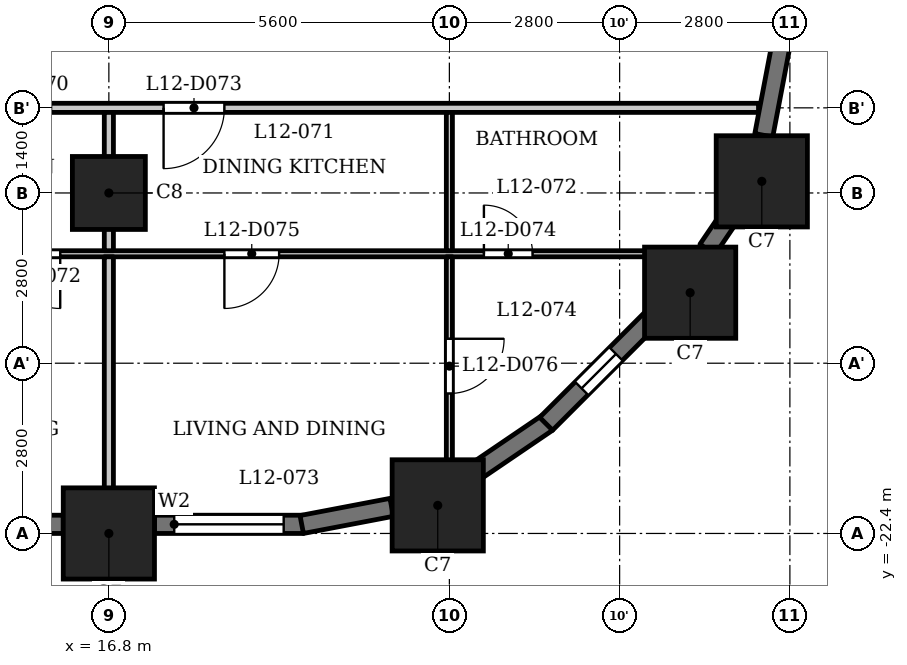
"""IFC4 building model, lengths in metres.
Left out: names, types, materials, properties, quantities, classifications, styles, units other than length and angle.
Written with IfcOpenShell. Run it as: python <this file> out.ifc"""

import sys

from ifc_helpers import new_model, si_unit, direction, frame, frame_2d, origin, origin_2d, place, context, subcontext, project, spatial, rectangle, extrude, element, fill, save


model = new_model("IFC4")
c1 = context("Model", 3, precision=1e-05, world=origin(), true_north=direction((0.0, 1.0)))
c2 = subcontext(c1, "Body", "Model", "MODEL_VIEW")
j1 = project(units=[si_unit("LENGTHUNIT", "METRE"), si_unit("PLANEANGLEUNIT", "RADIAN")], contexts=[c1])
p1 = place(None, origin())
s1 = spatial("IfcSite", under=j1, at=p1, CompositionType="ELEMENT")
p2 = place(p1, origin())
s2 = spatial("IfcBuilding", under=s1, at=p2, CompositionType="ELEMENT")
p3 = place(p2, frame((0.0, 0.0, 51.5)))
s3 = spatial("IfcBuildingStorey", under=s2, at=p3, CompositionType="ELEMENT", Elevation=51.5)
for number, where, z_axis, x_axis in (
    (1, (16.8, -22.4, 0.0), (0.0, 0.0, 1.0), (1.0, 0.0, 0.0)),
    (2, (22.209, -21.938, 0.0), (0.0, 0.0, 1.0), (1.0, 0.0, 0.0)),
    (3, (26.36, -18.44, 0.0), (0.0, 0.0, 1.0), (1.0, 0.0, 0.0)),
    (4, (27.538, -16.609, 0.0), (0.0, 0.0, 1.0), (1.0, 0.0, 0.0)),
):
    element("IfcColumn", number, at=place(p3, frame(where, z_axis=z_axis, x_axis=x_axis)), inside=s3, PredefinedType="COLUMN", context=c2, shape_type="SweptSolid", body=[
        extrude(rectangle(XDim=1.5, YDim=1.5, at=origin_2d()), origin(), (0.0, 0.0, 1.0), 3.5),
    ])
p4 = place(p3, frame((16.8, -16.8, 0.0), z_axis=(0.0, 0.0, 1.0), x_axis=(1.0, 0.0, 0.0)))
e5 = element("IfcColumn", 5, at=p4, inside=s3, PredefinedType="COLUMN", context=c2, shape_type="SweptSolid", body=[
    extrude(rectangle(XDim=1.2, YDim=1.2, at=origin_2d()), origin(), (0.0, 0.0, 1.0), 3.5),
])
p5 = place(p3, frame((11.95, -22.25, 0.0), z_axis=(0.0, 0.0, 1.0), x_axis=(1.0, 0.0, 0.0)))
e6 = element("IfcWall", 6, at=p5, inside=s3, PredefinedType="SOLIDWALL", context=c2, shape_type="SweptSolid", body=[
    extrude(rectangle(XDim=4.1, YDim=0.3, at=frame_2d((2.05, 0.0))), origin(), (0.0, 0.0, 1.0), 2.35),
])
p6 = place(p5, frame((0.75, 0.0, 0.9)))
e7 = element("IfcOpeningElement", 7, at=p6, cuts=e6, PredefinedType="OPENING", context=c2, shape_type="SweptSolid", body=[
    extrude(rectangle(XDim=2.6, YDim=1.25, at=frame_2d((1.3, 0.625))), frame((0.0, 0.16, 0.0), z_axis=(0.0, -1.0, 0.0), x_axis=(1.0, 0.0, 0.0)), (0.0, 0.0, 1.0), 0.32),
])
p7 = place(p3, frame((17.55, -22.25, 0.0), z_axis=(0.0, 0.0, 1.0), x_axis=(1.0, 0.0, 0.0)))
e8 = element("IfcWall", 8, at=p7, inside=s3, PredefinedType="SOLIDWALL", context=c2, shape_type="SweptSolid", body=[
    extrude(rectangle(XDim=2.45, YDim=0.3, at=frame_2d((1.225, 0.0))), origin(), (0.0, 0.0, 1.0), 2.35),
])
p8 = place(p7, frame((0.325, 0.0, 0.9)))
e9 = element("IfcOpeningElement", 9, at=p8, cuts=e8, PredefinedType="OPENING", context=c2, shape_type="SweptSolid", body=[
    extrude(rectangle(XDim=1.8, YDim=1.25, at=frame_2d((0.9, 0.625))), frame((0.0, 0.16, 0.0), z_axis=(0.0, -1.0, 0.0), x_axis=(1.0, 0.0, 0.0)), (0.0, 0.0, 1.0), 0.32),
])
for number, where, z_axis, x_axis in (
    (10, (19.972, -22.253, 0.0), (0.0, 0.0, 1.0), (0.982, 0.187, 0.0)),
    (11, (22.767, -21.426, 0.0), (0.0, 0.0, 1.0), (0.827, 0.562, 0.0)),
):
    element("IfcWall", number, at=place(p3, frame(where, z_axis=z_axis, x_axis=x_axis)), inside=s3, PredefinedType="SOLIDWALL", context=c2, shape_type="SweptSolid", body=[
        extrude(rectangle(XDim=1.506, YDim=0.3, at=frame_2d((0.753, 0.0))), origin(), (0.0, 0.0, 1.0), 2.35),
    ])
p9 = place(p3, frame((23.991, -20.597, 0.0), z_axis=(0.0, 0.0, 1.0), x_axis=(0.707106781187, 0.707106781187, 0.0)))
e12 = element("IfcWall", 12, at=p9, inside=s3, PredefinedType="SOLIDWALL", context=c2, shape_type="SweptSolid", body=[
    extrude(rectangle(XDim=2.45, YDim=0.3, at=frame_2d((1.225, 0.0))), origin(), (0.0, 0.0, 1.0), 2.35),
])
p10 = place(p9, frame((0.825, 0.0, 0.6)))
e13 = element("IfcOpeningElement", 13, at=p10, cuts=e12, PredefinedType="OPENING", context=c2, shape_type="SweptSolid", body=[
    extrude(rectangle(XDim=0.8, YDim=1.55, at=frame_2d((0.4, 0.775))), frame((0.0, 0.16, 0.0), z_axis=(0.0, -1.0, 0.0), x_axis=(1.0, 0.0, 0.0)), (0.0, 0.0, 1.0), 0.32),
])
p11 = place(p3, frame((26.645, -17.727, 0.0), z_axis=(0.0, 0.0, 1.0), x_axis=(0.562083182981, 0.827080706709, 0.0)))
e14 = element("IfcWall", 14, at=p11, inside=s3, PredefinedType="SOLIDWALL", context=c2, shape_type="SweptSolid", body=[
    extrude(rectangle(XDim=0.677, YDim=0.3, at=frame_2d((0.339, 0.0))), origin(), (0.0, 0.0, 1.0), 3.2),
])
p12 = place(p3, frame((27.571, -15.851, 0.0), z_axis=(0.0, 0.0, 1.0), x_axis=(0.187223837635, 0.982317277982, 0.0)))
e15 = element("IfcWall", 15, at=p12, inside=s3, PredefinedType="SOLIDWALL", context=c2, shape_type="SweptSolid", body=[
    extrude(rectangle(XDim=1.506, YDim=0.3, at=frame_2d((0.753, 0.0))), origin(), (0.0, 0.0, 1.0), 2.35),
])
p13 = place(p3, frame((-26.394, -17.8, 0.0), z_axis=(0.0, 0.0, 1.0), x_axis=(1.0, 0.0, 0.0)))
e16 = element("IfcWall", 16, at=p13, inside=s3, PredefinedType="PARTITIONING", context=c2, shape_type="SweptSolid", body=[
    extrude(rectangle(XDim=53.126, YDim=0.1, at=frame_2d((26.563, 0.0))), origin(), (0.0, 0.0, 1.0), 3.2),
])
p14 = place(p13, frame((0.794, 0.0, 0.0)))
e17 = element("IfcOpeningElement", 17, at=p14, cuts=e16, PredefinedType="OPENING", context=c2, shape_type="SweptSolid", body=[
    extrude(rectangle(XDim=0.8, YDim=2.1, at=frame_2d((0.4, 1.05))), frame((0.0, 0.06, 0.0), z_axis=(0.0, -1.0, 0.0), x_axis=(1.0, 0.0, 0.0)), (0.0, 0.0, 1.0), 0.12),
])
p15 = place(p13, frame((5.644, 0.0, 0.0)))
e18 = element("IfcOpeningElement", 18, at=p15, cuts=e16, PredefinedType="OPENING", context=c2, shape_type="SweptSolid", body=[
    extrude(rectangle(XDim=0.9, YDim=2.1, at=frame_2d((0.45, 1.05))), frame((0.0, 0.06, 0.0), z_axis=(0.0, -1.0, 0.0), x_axis=(1.0, 0.0, 0.0)), (0.0, 0.0, 1.0), 0.12),
])
p16 = place(p13, frame((19.344, 0.0, 0.0)))
e19 = element("IfcOpeningElement", 19, at=p16, cuts=e16, PredefinedType="OPENING", context=c2, shape_type="SweptSolid", body=[
    extrude(rectangle(XDim=0.8, YDim=2.1, at=frame_2d((0.4, 1.05))), frame((0.0, 0.06, 0.0), z_axis=(0.0, -1.0, 0.0), x_axis=(1.0, 0.0, 0.0)), (0.0, 0.0, 1.0), 0.12),
])
p17 = place(p13, frame((17.094, 0.0, 0.0)))
e20 = element("IfcOpeningElement", 20, at=p17, cuts=e16, PredefinedType="OPENING", context=c2, shape_type="SweptSolid", body=[
    extrude(rectangle(XDim=0.9, YDim=2.1, at=frame_2d((0.45, 1.05))), frame((0.0, 0.06, 0.0), z_axis=(0.0, -1.0, 0.0), x_axis=(1.0, 0.0, 0.0)), (0.0, 0.0, 1.0), 0.12),
])
p18 = place(p13, frame((10.494, 0.0, 0.0)))
e21 = element("IfcOpeningElement", 21, at=p18, cuts=e16, PredefinedType="OPENING", context=c2, shape_type="SweptSolid", body=[
    extrude(rectangle(XDim=0.9, YDim=2.1, at=frame_2d((0.45, 1.05))), frame((0.0, 0.06, 0.0), z_axis=(0.0, -1.0, 0.0), x_axis=(1.0, 0.0, 0.0)), (0.0, 0.0, 1.0), 0.12),
])
p19 = place(p13, frame((13.294, 0.0, 0.0)))
e22 = element("IfcOpeningElement", 22, at=p19, cuts=e16, PredefinedType="OPENING", context=c2, shape_type="SweptSolid", body=[
    extrude(rectangle(XDim=0.9, YDim=2.1, at=frame_2d((0.45, 1.05))), frame((0.0, 0.06, 0.0), z_axis=(0.0, -1.0, 0.0), x_axis=(1.0, 0.0, 0.0)), (0.0, 0.0, 1.0), 0.12),
])
p20 = place(p13, frame((27.044, 0.0, 0.0)))
e23 = element("IfcOpeningElement", 23, at=p20, cuts=e16, PredefinedType="OPENING", context=c2, shape_type="SweptSolid", body=[
    extrude(rectangle(XDim=0.8, YDim=2.1, at=frame_2d((0.4, 1.05))), frame((0.0, 0.06, 0.0), z_axis=(0.0, -1.0, 0.0), x_axis=(1.0, 0.0, 0.0)), (0.0, 0.0, 1.0), 0.12),
])
p21 = place(p13, frame((22.444, 0.0, 0.0)))
e24 = element("IfcOpeningElement", 24, at=p21, cuts=e16, PredefinedType="OPENING", context=c2, shape_type="SweptSolid", body=[
    extrude(rectangle(XDim=0.9, YDim=2.1, at=frame_2d((0.45, 1.05))), frame((0.0, 0.06, 0.0), z_axis=(0.0, -1.0, 0.0), x_axis=(1.0, 0.0, 0.0)), (0.0, 0.0, 1.0), 0.12),
])
p22 = place(p13, frame((36.144, 0.0, 0.0)))
e25 = element("IfcOpeningElement", 25, at=p22, cuts=e16, PredefinedType="OPENING", context=c2, shape_type="SweptSolid", body=[
    extrude(rectangle(XDim=0.8, YDim=2.1, at=frame_2d((0.4, 1.05))), frame((0.0, 0.06, 0.0), z_axis=(0.0, -1.0, 0.0), x_axis=(1.0, 0.0, 0.0)), (0.0, 0.0, 1.0), 0.12),
])
p23 = place(p13, frame((33.644, 0.0, 0.0)))
e26 = element("IfcOpeningElement", 26, at=p23, cuts=e16, PredefinedType="OPENING", context=c2, shape_type="SweptSolid", body=[
    extrude(rectangle(XDim=0.9, YDim=2.1, at=frame_2d((0.45, 1.05))), frame((0.0, 0.06, 0.0), z_axis=(0.0, -1.0, 0.0), x_axis=(1.0, 0.0, 0.0)), (0.0, 0.0, 1.0), 0.12),
])
p24 = place(p13, frame((39.144, 0.0, 0.0)))
e27 = element("IfcOpeningElement", 27, at=p24, cuts=e16, PredefinedType="OPENING", context=c2, shape_type="SweptSolid", body=[
    extrude(rectangle(XDim=0.8, YDim=2.1, at=frame_2d((0.4, 1.05))), frame((0.0, 0.06, 0.0), z_axis=(0.0, -1.0, 0.0), x_axis=(1.0, 0.0, 0.0)), (0.0, 0.0, 1.0), 0.12),
])
p25 = place(p13, frame((41.494, 0.0, 0.0)))
e28 = element("IfcOpeningElement", 28, at=p25, cuts=e16, PredefinedType="OPENING", context=c2, shape_type="SweptSolid", body=[
    extrude(rectangle(XDim=0.9, YDim=2.1, at=frame_2d((0.45, 1.05))), frame((0.0, 0.06, 0.0), z_axis=(0.0, -1.0, 0.0), x_axis=(1.0, 0.0, 0.0)), (0.0, 0.0, 1.0), 0.12),
])
p26 = place(p13, frame((49.362, 0.0, 0.0)))
e29 = element("IfcOpeningElement", 29, at=p26, cuts=e16, PredefinedType="OPENING", context=c2, shape_type="SweptSolid", body=[
    extrude(rectangle(XDim=0.8, YDim=2.1, at=frame_2d((0.4, 1.05))), frame((0.0, 0.06, 0.0), z_axis=(0.0, -1.0, 0.0), x_axis=(1.0, 0.0, 0.0)), (0.0, 0.0, 1.0), 0.12),
])
p27 = place(p13, frame((45.094, 0.0, 0.0)))
e30 = element("IfcOpeningElement", 30, at=p27, cuts=e16, PredefinedType="OPENING", context=c2, shape_type="SweptSolid", body=[
    extrude(rectangle(XDim=0.9, YDim=2.1, at=frame_2d((0.45, 1.05))), frame((0.0, 0.06, 0.0), z_axis=(0.0, -1.0, 0.0), x_axis=(1.0, 0.0, 0.0)), (0.0, 0.0, 1.0), 0.12),
])
p28 = place(p3, frame((-27.484, -15.4, 0.0), z_axis=(0.0, 0.0, 1.0), x_axis=(1.0, 0.0, 0.0)))
e31 = element("IfcWall", 31, at=p28, inside=s3, PredefinedType="PARTITIONING", context=c2, shape_type="SweptSolid", body=[
    extrude(rectangle(XDim=54.968, YDim=0.15, at=frame_2d((27.484, 0.0))), origin(), (0.0, 0.0, 1.0), 3.2),
])
p29 = place(p28, frame((5.734, 0.0, 0.0)))
e32 = element("IfcOpeningElement", 32, at=p29, cuts=e31, PredefinedType="OPENING", context=c2, shape_type="SweptSolid", body=[
    extrude(rectangle(XDim=1.0, YDim=2.1, at=frame_2d((0.5, 1.05))), frame((0.0, 0.085, 0.0), z_axis=(0.0, -1.0, 0.0), x_axis=(1.0, 0.0, 0.0)), (0.0, 0.0, 1.0), 0.17),
])
p30 = place(p28, frame((11.584, 0.0, 0.0)))
e33 = element("IfcOpeningElement", 33, at=p30, cuts=e31, PredefinedType="OPENING", context=c2, shape_type="SweptSolid", body=[
    extrude(rectangle(XDim=1.0, YDim=2.1, at=frame_2d((0.5, 1.05))), frame((0.0, 0.085, 0.0), z_axis=(0.0, -1.0, 0.0), x_axis=(1.0, 0.0, 0.0)), (0.0, 0.0, 1.0), 0.17),
])
p31 = place(p28, frame((22.534, 0.0, 0.0)))
e34 = element("IfcOpeningElement", 34, at=p31, cuts=e31, PredefinedType="OPENING", context=c2, shape_type="SweptSolid", body=[
    extrude(rectangle(XDim=1.0, YDim=2.1, at=frame_2d((0.5, 1.05))), frame((0.0, 0.085, 0.0), z_axis=(0.0, -1.0, 0.0), x_axis=(1.0, 0.0, 0.0)), (0.0, 0.0, 1.0), 0.17),
])
p32 = place(p28, frame((33.734, 0.0, 0.0)))
e35 = element("IfcOpeningElement", 35, at=p32, cuts=e31, PredefinedType="OPENING", context=c2, shape_type="SweptSolid", body=[
    extrude(rectangle(XDim=1.0, YDim=2.1, at=frame_2d((0.5, 1.05))), frame((0.0, 0.085, 0.0), z_axis=(0.0, -1.0, 0.0), x_axis=(1.0, 0.0, 0.0)), (0.0, 0.0, 1.0), 0.17),
])
p33 = place(p28, frame((42.334, 0.0, 0.0)))
e36 = element("IfcOpeningElement", 36, at=p33, cuts=e31, PredefinedType="OPENING", context=c2, shape_type="SweptSolid", body=[
    extrude(rectangle(XDim=1.0, YDim=2.1, at=frame_2d((0.5, 1.05))), frame((0.0, 0.085, 0.0), z_axis=(0.0, -1.0, 0.0), x_axis=(1.0, 0.0, 0.0)), (0.0, 0.0, 1.0), 0.17),
])
p34 = place(p28, frame((45.184, 0.0, 0.0)))
e37 = element("IfcOpeningElement", 37, at=p34, cuts=e31, PredefinedType="OPENING", context=c2, shape_type="SweptSolid", body=[
    extrude(rectangle(XDim=1.0, YDim=2.1, at=frame_2d((0.5, 1.05))), frame((0.0, 0.085, 0.0), z_axis=(0.0, -1.0, 0.0), x_axis=(1.0, 0.0, 0.0)), (0.0, 0.0, 1.0), 0.17),
])
p35 = place(p3, frame((16.8, -23.13, 0.0), z_axis=(0.0, 0.0, 1.0), x_axis=(0.0, 1.0, 0.0)))
e38 = element("IfcWall", 38, at=p35, inside=s3, PredefinedType="PARTITIONING", context=c2, shape_type="SweptSolid", body=[
    extrude(rectangle(XDim=5.28, YDim=0.15, at=frame_2d((2.64, 0.0))), origin(), (0.0, 0.0, 1.0), 3.2),
])
p36 = place(p3, frame((16.8, -17.75, 0.0), z_axis=(0.0, 0.0, 1.0), x_axis=(0.0, 1.0, 0.0)))
e39 = element("IfcWall", 39, at=p36, inside=s3, PredefinedType="PARTITIONING", context=c2, shape_type="SweptSolid", body=[
    extrude(rectangle(XDim=2.275, YDim=0.15, at=frame_2d((1.137, 0.0))), origin(), (0.0, 0.0, 1.0), 3.2),
])
p37 = place(p3, frame((22.4, -21.72, 0.0), z_axis=(0.0, 0.0, 1.0), x_axis=(0.0, 1.0, 0.0)))
e40 = element("IfcWall", 40, at=p37, inside=s3, PredefinedType="PARTITIONING", context=c2, shape_type="SweptSolid", body=[
    extrude(rectangle(XDim=3.87, YDim=0.1, at=frame_2d((1.935, 0.0))), origin(), (0.0, 0.0, 1.0), 3.2),
])
p38 = place(p37, frame((1.622, 0.0, 0.0)))
e41 = element("IfcOpeningElement", 41, at=p38, cuts=e40, PredefinedType="OPENING", context=c2, shape_type="SweptSolid", body=[
    extrude(rectangle(XDim=0.9, YDim=2.1, at=frame_2d((0.45, 1.05))), frame((0.0, 0.06, 0.0), z_axis=(0.0, -1.0, 0.0), x_axis=(1.0, 0.0, 0.0)), (0.0, 0.0, 1.0), 0.12),
])
p39 = place(p3, frame((22.4, -17.75, 0.0), z_axis=(0.0, 0.0, 1.0), x_axis=(0.0, 1.0, 0.0)))
e42 = element("IfcWall", 42, at=p39, inside=s3, PredefinedType="PARTITIONING", context=c2, shape_type="SweptSolid", body=[
    extrude(rectangle(XDim=2.275, YDim=0.1, at=frame_2d((1.137, 0.0))), origin(), (0.0, 0.0, 1.0), 3.2),
])
p40 = place(p25, origin())
e43 = element("IfcDoor", 43, at=p40, inside=s3, OperationType="SINGLE_SWING_RIGHT", PredefinedType="DOOR", context=c2, shape_type="SweptSolid", body=[
    extrude(rectangle(XDim=0.9, YDim=2.1, at=frame_2d((0.45, 1.05))), frame((0.0, 0.025, 0.0), z_axis=(0.0, -1.0, 0.0), x_axis=(1.0, 0.0, 0.0)), (0.0, 0.0, 1.0), 0.05),
])
fill(e28, e43)
p41 = place(p34, origin())
e44 = element("IfcDoor", 44, at=p41, inside=s3, OperationType="SINGLE_SWING_LEFT", PredefinedType="DOOR", context=c2, shape_type="SweptSolid", body=[
    extrude(rectangle(XDim=1.0, YDim=2.1, at=frame_2d((0.5, 1.05))), frame((0.0, 0.025, 0.0), z_axis=(0.0, -1.0, 0.0), x_axis=(1.0, 0.0, 0.0)), (0.0, 0.0, 1.0), 0.05),
])
fill(e37, e44)
p42 = place(p26, origin())
e45 = element("IfcDoor", 45, at=p42, inside=s3, OperationType="SINGLE_SWING_RIGHT", PredefinedType="DOOR", context=c2, shape_type="SweptSolid", body=[
    extrude(rectangle(XDim=0.8, YDim=2.1, at=frame_2d((0.4, 1.05))), frame((0.0, 0.025, 0.0), z_axis=(0.0, -1.0, 0.0), x_axis=(1.0, 0.0, 0.0)), (0.0, 0.0, 1.0), 0.05),
])
fill(e29, e45)
p43 = place(p27, origin())
e46 = element("IfcDoor", 46, at=p43, inside=s3, OperationType="SINGLE_SWING_LEFT", PredefinedType="DOOR", context=c2, shape_type="SweptSolid", body=[
    extrude(rectangle(XDim=0.9, YDim=2.1, at=frame_2d((0.45, 1.05))), frame((0.0, 0.025, 0.0), z_axis=(0.0, -1.0, 0.0), x_axis=(1.0, 0.0, 0.0)), (0.0, 0.0, 1.0), 0.05),
])
fill(e30, e46)
p44 = place(p38, origin())
e47 = element("IfcDoor", 47, at=p44, inside=s3, OperationType="SINGLE_SWING_RIGHT", PredefinedType="DOOR", context=c2, shape_type="SweptSolid", body=[
    extrude(rectangle(XDim=0.9, YDim=2.1, at=frame_2d((0.45, 1.05))), frame((0.0, 0.025, 0.0), z_axis=(0.0, -1.0, 0.0), x_axis=(1.0, 0.0, 0.0)), (0.0, 0.0, 1.0), 0.05),
])
fill(e41, e47)
p45 = place(p8, origin())
e48 = element("IfcWindow", 48, at=p45, inside=s3, PartitioningType="SINGLE_PANEL", PredefinedType="WINDOW", context=c2, shape_type="SweptSolid", body=[
    extrude(rectangle(XDim=1.8, YDim=1.25, at=frame_2d((0.9, 0.625))), frame((0.0, 0.03, 0.0), z_axis=(0.0, -1.0, 0.0), x_axis=(1.0, 0.0, 0.0)), (0.0, 0.0, 1.0), 0.06),
])
fill(e9, e48)
p46 = place(p10, origin())
e49 = element("IfcWindow", 49, at=p46, inside=s3, PartitioningType="SINGLE_PANEL", PredefinedType="WINDOW", context=c2, shape_type="SweptSolid", body=[
    extrude(rectangle(XDim=0.8, YDim=1.55, at=frame_2d((0.4, 0.775))), frame((0.0, 0.03, 0.0), z_axis=(0.0, -1.0, 0.0), x_axis=(1.0, 0.0, 0.0)), (0.0, 0.0, 1.0), 0.06),
])
fill(e13, e49)
save(model, sys.argv[1])
